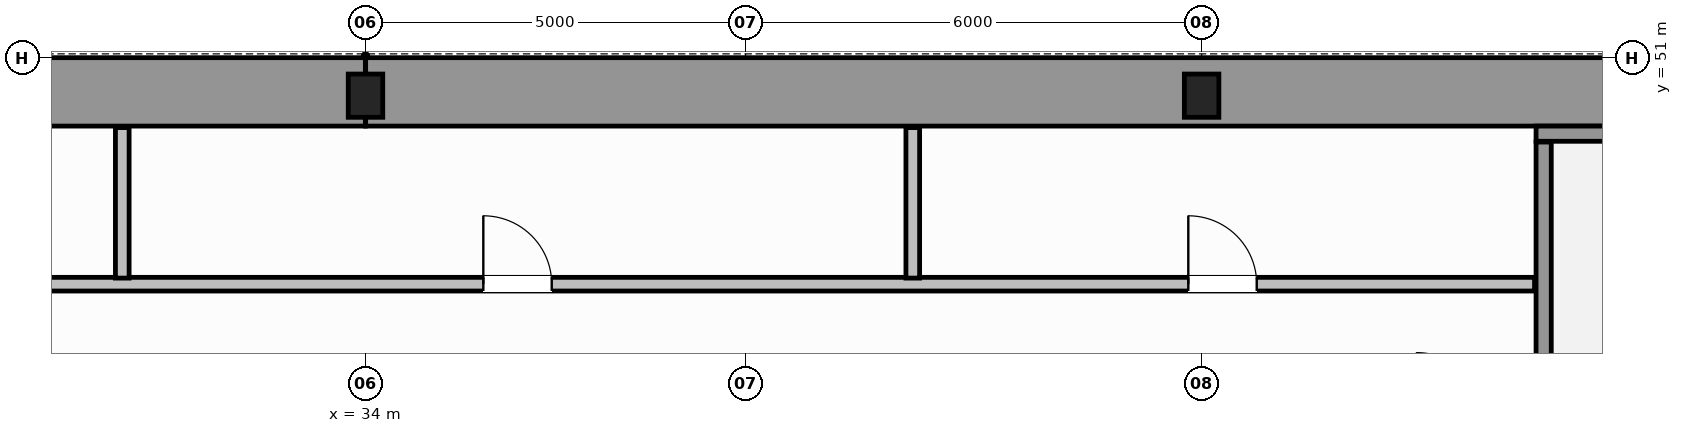
"""IFC4 building model, lengths in metres.
Left out: names, types, materials, properties, quantities, classifications, styles, units other than length and angle.
Written with IfcOpenShell. Run it as: python <this file> out.ifc"""

import sys

from ifc_helpers import new_model, si_unit, direction, frame, frame_2d, origin, origin_2d, place, context, subcontext, project, spatial, rectangle, i_section, extrude, source, transform, mapped, element, fill, save


model = new_model("IFC4")
c1 = context("Model", 3, precision=1e-05, world=origin(), true_north=direction((0.0, 1.0)))
c2 = subcontext(c1, "Body", "Model", "MODEL_VIEW")
j1 = project(units=[si_unit("LENGTHUNIT", "METRE"), si_unit("PLANEANGLEUNIT", "RADIAN")], contexts=[c1])
p1 = place(None, origin())
s1 = spatial("IfcSite", under=j1, at=p1, CompositionType="ELEMENT")
p2 = place(p1, origin())
s2 = spatial("IfcBuilding", under=s1, at=p2, CompositionType="ELEMENT")
p3 = place(p2, frame((0.0, 0.0, 53.0)))
s3 = spatial("IfcBuildingStorey", under=s2, at=p3, CompositionType="ELEMENT", Elevation=53.0)
m1 = source(origin(), c2, "Body", "SweptSolid", [
    extrude(i_section(OverallWidth=0.454, OverallDepth=0.569, WebThickness=0.078, FlangeThickness=0.08, FilletRadius=0.015, at=origin_2d()), origin(), (0.0, 0.0, 1.0), 3.8),
])
for number, where, z_axis, x_axis in (
    (1, (34.0, 50.5, 0.0), (0.0, 0.0, 1.0), (1.0, 0.0, 0.0)),
    (2, (45.0, 50.5, 0.0), (0.0, 0.0, 1.0), (1.0, 0.0, 0.0)),
):
    element("IfcColumn", number, at=place(p3, frame(where, z_axis=z_axis, x_axis=x_axis)), inside=s3, PredefinedType="COLUMN", context=c2, shape_type="MappedRepresentation", body=[
        mapped(m1, transform((0.0, 0.0, 0.0), scale=1.0)),
    ])
for number, where, z_axis, x_axis in (
    (3, (14.454, 50.55, 0.0), (0.0, 0.0, 1.0), (1.0, 0.0, 0.0)),
    (4, (34.002, 50.55, 0.0), (0.0, 0.0, 1.0), (1.0, 0.0, 0.0)),
):
    element("IfcWall", number, at=place(p3, frame(where, z_axis=z_axis, x_axis=x_axis)), inside=s3, PredefinedType="SHEAR", context=c2, shape_type="SweptSolid", body=[
        extrude(rectangle(XDim=19.544, YDim=0.9, at=frame_2d((9.772, 0.0))), origin(), (0.0, 0.0, 1.0), 3.8),
    ])
p4 = place(p3, frame((49.4, 50.0, 0.0), z_axis=(0.0, 0.0, 1.0), x_axis=(1.0, 0.0, 0.0)))
e5 = element("IfcWall", 5, at=p4, inside=s3, PredefinedType="SOLIDWALL", context=c2, shape_type="SweptSolid", body=[
    extrude(rectangle(XDim=4.15, YDim=0.2, at=frame_2d((2.075, 0.0))), origin(), (0.0, 0.0, 1.0), 3.8),
])
p5 = place(p3, frame((49.5, 39.96, 0.0), z_axis=(0.0, 0.0, 1.0), x_axis=(0.0, 1.0, 0.0)))
e6 = element("IfcWall", 6, at=p5, inside=s3, PredefinedType="SOLIDWALL", context=c2, shape_type="SweptSolid", body=[
    extrude(rectangle(XDim=9.93, YDim=0.2, at=frame_2d((4.965, 0.0))), origin(), (0.0, 0.0, 1.0), 3.8),
])
p6 = place(p3, frame((18.62, 48.02, 0.0), z_axis=(0.0, 0.0, 1.0), x_axis=(1.0, 0.0, 0.0)))
e7 = element("IfcWall", 7, at=p6, inside=s3, PredefinedType="PLUMBINGWALL", context=c2, shape_type="SweptSolid", body=[
    extrude(rectangle(XDim=30.76, YDim=0.18, at=frame_2d((15.38, 0.0))), origin(), (0.0, 0.0, 1.0), 3.58),
])
p7 = place(p6, frame((1.955, 0.0, 0.0)))
e8 = element("IfcOpeningElement", 8, at=p7, cuts=e7, PredefinedType="OPENING", context=c2, shape_type="SweptSolid", body=[
    extrude(rectangle(XDim=0.9, YDim=2.15, at=frame_2d((0.45, 1.075))), frame((0.0, 0.1, 0.0), z_axis=(0.0, -1.0, 0.0), x_axis=(1.0, 0.0, 0.0)), (0.0, 0.0, 1.0), 0.2),
])
p8 = place(p6, frame((8.03, 0.0, 0.0)))
e9 = element("IfcOpeningElement", 9, at=p8, cuts=e7, PredefinedType="OPENING", context=c2, shape_type="SweptSolid", body=[
    extrude(rectangle(XDim=0.9, YDim=2.15, at=frame_2d((0.45, 1.075))), frame((0.0, 0.1, 0.0), z_axis=(0.0, -1.0, 0.0), x_axis=(1.0, 0.0, 0.0)), (0.0, 0.0, 1.0), 0.2),
])
p9 = place(p6, frame((16.93, 0.0, 0.0)))
e10 = element("IfcOpeningElement", 10, at=p9, cuts=e7, PredefinedType="OPENING", context=c2, shape_type="SweptSolid", body=[
    extrude(rectangle(XDim=0.9, YDim=2.15, at=frame_2d((0.45, 1.075))), frame((0.0, 0.1, 0.0), z_axis=(0.0, -1.0, 0.0), x_axis=(1.0, 0.0, 0.0)), (0.0, 0.0, 1.0), 0.2),
])
p10 = place(p6, frame((26.205, 0.0, 0.0)))
e11 = element("IfcOpeningElement", 11, at=p10, cuts=e7, PredefinedType="OPENING", context=c2, shape_type="SweptSolid", body=[
    extrude(rectangle(XDim=0.9, YDim=2.15, at=frame_2d((0.45, 1.075))), frame((0.0, 0.1, 0.0), z_axis=(0.0, -1.0, 0.0), x_axis=(1.0, 0.0, 0.0)), (0.0, 0.0, 1.0), 0.2),
])
for number, where, z_axis, x_axis in (
    (12, (30.8, 48.1, 0.0), (0.0, 0.0, 1.0), (0.0, 1.0, 0.0)),
    (13, (41.2, 48.1, 0.0), (0.0, 0.0, 1.0), (0.0, 1.0, 0.0)),
):
    element("IfcWall", number, at=place(p3, frame(where, z_axis=z_axis, x_axis=x_axis)), inside=s3, PredefinedType="PLUMBINGWALL", context=c2, shape_type="SweptSolid", body=[
        extrude(rectangle(XDim=1.98, YDim=0.18, at=frame_2d((0.99, 0.0))), origin(), (0.0, 0.0, 1.0), 3.58),
    ])
m2 = source(origin(), c2, "Body", "SweptSolid", [
    extrude(rectangle(XDim=0.9, YDim=2.15, at=frame_2d((0.45, 1.075))), frame((0.0, 0.025, 0.0), z_axis=(0.0, -1.0, 0.0), x_axis=(1.0, 0.0, 0.0)), (0.0, 0.0, 1.0), 0.05),
])
p11 = place(p9, origin())
e14 = element("IfcDoor", 14, at=p11, inside=s3, OperationType="SINGLE_SWING_LEFT", PredefinedType="DOOR", context=c2, shape_type="MappedRepresentation", body=[
    mapped(m2, transform((0.0, 0.0, 0.0), scale=1.0)),
])
fill(e10, e14)
p12 = place(p10, origin())
e15 = element("IfcDoor", 15, at=p12, inside=s3, OperationType="SINGLE_SWING_RIGHT", PredefinedType="DOOR", context=c2, shape_type="MappedRepresentation", body=[
    mapped(m2, transform((0.0, 0.0, 0.0), scale=1.0)),
])
fill(e11, e15)
save(model, sys.argv[1])
